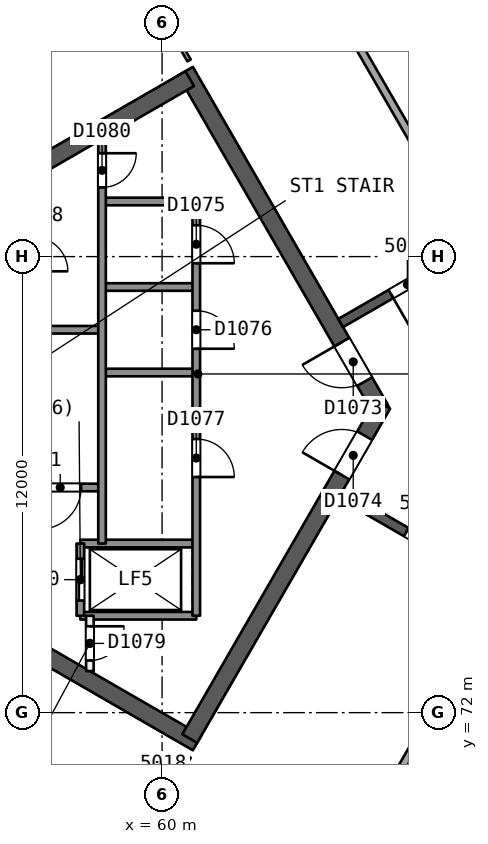
"""IFC4 building model, lengths in metres.
Left out: names, types, materials, properties, quantities, classifications, styles, units other than length and angle.
Written with IfcOpenShell. Run it as: python <this file> out.ifc"""

import sys

from ifc_helpers import new_model, si_unit, direction, frame, frame_2d, origin, place, context, subcontext, project, spatial, rectangle, extrude, element, fill, save


model = new_model("IFC4")
c1 = context("Model", 3, precision=1e-05, world=origin(), true_north=direction((0.0, 1.0)))
c2 = subcontext(c1, "Body", "Model", "MODEL_VIEW")
j1 = project(units=[si_unit("LENGTHUNIT", "METRE"), si_unit("PLANEANGLEUNIT", "RADIAN")], contexts=[c1])
p1 = place(None, origin())
s1 = spatial("IfcSite", under=j1, at=p1, CompositionType="ELEMENT")
p2 = place(p1, origin())
s2 = spatial("IfcBuilding", under=s1, at=p2, CompositionType="ELEMENT")
p3 = place(p2, frame((0.0, 0.0, 205.8)))
s3 = spatial("IfcBuildingStorey", under=s2, at=p3, CompositionType="ELEMENT", Elevation=205.8)
p4 = place(p3, frame((65.74, 80.0, 0.0), z_axis=(0.0, 0.0, 1.0), x_axis=(-0.499991857942, 0.866030104553, 0.0)))
e1 = element("IfcWall", 1, at=p4, inside=s3, PredefinedType="SHEAR", context=c2, shape_type="SweptSolid", body=[
    extrude(rectangle(XDim=10.25, YDim=0.45, at=frame_2d((5.125, 0.0))), origin(), (0.0, 0.0, 1.0), 3.7),
])
p5 = place(p4, frame((0.82, 0.0, 0.0)))
e2 = element("IfcOpeningElement", 2, at=p5, cuts=e1, PredefinedType="OPENING", context=c2, shape_type="SweptSolid", body=[
    extrude(rectangle(XDim=1.2, YDim=2.1, at=frame_2d((0.6, 1.05))), frame((0.0, 0.235, 0.0), z_axis=(0.0, -1.0, 0.0), x_axis=(1.0, 0.0, 0.0)), (0.0, 0.0, 1.0), 0.471),
])
p6 = place(p3, frame((60.728, 88.682, 0.0), z_axis=(0.0, 0.0, 1.0), x_axis=(-0.866021613849, -0.500006564303, 0.0)))
e3 = element("IfcWall", 3, at=p6, inside=s3, PredefinedType="SHEAR", context=c2, shape_type="SweptSolid", body=[
    extrude(rectangle(XDim=14.108, YDim=0.45, at=frame_2d((7.054, 0.0))), origin(), (0.0, 0.0, 1.0), 3.7),
])
p7 = place(p3, frame((48.622, 78.307, 0.0), z_axis=(0.0, 0.0, 1.0), x_axis=(0.86602701116, -0.499997215934, 0.0)))
e4 = element("IfcWall", 4, at=p7, inside=s3, PredefinedType="SHEAR", context=c2, shape_type="SweptSolid", body=[
    extrude(rectangle(XDim=14.204, YDim=0.45, at=frame_2d((7.102, 0.0))), origin(), (0.0, 0.0, 1.0), 3.7),
])
p8 = place(p3, frame((60.728, 71.318, 0.0), z_axis=(0.0, 0.0, 1.0), x_axis=(0.500012416173, 0.866018235185, 0.0)))
e5 = element("IfcWall", 5, at=p8, inside=s3, PredefinedType="SHEAR", context=c2, shape_type="SweptSolid", body=[
    extrude(rectangle(XDim=10.155, YDim=0.45, at=frame_2d((5.078, 0.0))), origin(), (0.0, 0.0, 1.0), 3.7),
])
p9 = place(p8, frame((8.005, 0.0, 0.0)))
e6 = element("IfcOpeningElement", 6, at=p9, cuts=e5, PredefinedType="OPENING", context=c2, shape_type="SweptSolid", body=[
    extrude(rectangle(XDim=1.2, YDim=2.1, at=frame_2d((0.6, 1.05))), frame((0.0, 0.235, 0.0), z_axis=(0.0, -1.0, 0.0), x_axis=(1.0, 0.0, 0.0)), (0.0, 0.0, 1.0), 0.471),
])
p10 = place(p3, frame((78.2, 90.046, 0.0), z_axis=(0.0, 0.0, 1.0), x_axis=(-0.866026492143, -0.499998114903, 0.0)))
e7 = element("IfcWall", 7, at=p10, inside=s3, PredefinedType="SHEAR", context=c2, shape_type="SweptSolid", body=[
    extrude(rectangle(XDim=15.588, YDim=0.25, at=frame_2d((7.794, 0.0))), origin(), (0.0, 0.0, 1.0), 3.3),
])
p11 = place(p10, frame((1.527, 0.0, 0.0)))
e8 = element("IfcOpeningElement", 8, at=p11, cuts=e7, PredefinedType="OPENING", context=c2, shape_type="SweptSolid", body=[
    extrude(rectangle(XDim=1.0, YDim=2.1, at=frame_2d((0.5, 1.05))), frame((0.0, 0.135, 0.0), z_axis=(0.0, -1.0, 0.0), x_axis=(1.0, 0.0, 0.0)), (0.0, 0.0, 1.0), 0.271),
])
p12 = place(p10, frame((8.694, 0.0, 0.0)))
e9 = element("IfcOpeningElement", 9, at=p12, cuts=e7, PredefinedType="OPENING", context=c2, shape_type="SweptSolid", body=[
    extrude(rectangle(XDim=1.1, YDim=2.1, at=frame_2d((0.55, 1.05))), frame((0.0, 0.135, 0.0), z_axis=(0.0, -1.0, 0.0), x_axis=(1.0, 0.0, 0.0)), (0.0, 0.0, 1.0), 0.271),
])
p13 = place(p10, frame((13.062, 0.0, 0.0)))
e10 = element("IfcOpeningElement", 10, at=p13, cuts=e7, PredefinedType="OPENING", context=c2, shape_type="SweptSolid", body=[
    extrude(rectangle(XDim=1.0, YDim=2.1, at=frame_2d((0.5, 1.05))), frame((0.0, 0.135, 0.0), z_axis=(0.0, -1.0, 0.0), x_axis=(1.0, 0.0, 0.0)), (0.0, 0.0, 1.0), 0.271),
])
p14 = place(p3, frame((64.7, 77.748, 0.0), z_axis=(0.0, 0.0, 1.0), x_axis=(0.866026492143, -0.499998114903, 0.0)))
e11 = element("IfcWall", 11, at=p14, inside=s3, PredefinedType="SHEAR", context=c2, shape_type="SweptSolid", body=[
    extrude(rectangle(XDim=15.588, YDim=0.25, at=frame_2d((7.794, 0.0))), origin(), (0.0, 0.0, 1.0), 3.3),
])
p15 = place(p14, frame((1.994, 0.0, 0.0)))
e12 = element("IfcOpeningElement", 12, at=p15, cuts=e11, PredefinedType="OPENING", context=c2, shape_type="SweptSolid", body=[
    extrude(rectangle(XDim=1.0, YDim=2.1, at=frame_2d((0.5, 1.05))), frame((0.0, 0.135, 0.0), z_axis=(0.0, -1.0, 0.0), x_axis=(1.0, 0.0, 0.0)), (0.0, 0.0, 1.0), 0.271),
])
p16 = place(p14, frame((6.571, 0.0, 0.0)))
e13 = element("IfcOpeningElement", 13, at=p16, cuts=e11, PredefinedType="OPENING", context=c2, shape_type="SweptSolid", body=[
    extrude(rectangle(XDim=1.2, YDim=2.4, at=frame_2d((0.6, 1.2))), frame((0.0, 0.135, 0.0), z_axis=(0.0, -1.0, 0.0), x_axis=(1.0, 0.0, 0.0)), (0.0, 0.0, 1.0), 0.271),
])
p17 = place(p14, frame((11.971, 0.0, 0.0)))
e14 = element("IfcOpeningElement", 14, at=p17, cuts=e11, PredefinedType="OPENING", context=c2, shape_type="SweptSolid", body=[
    extrude(rectangle(XDim=1.0, YDim=2.1, at=frame_2d((0.5, 1.05))), frame((0.0, 0.135, 0.0), z_axis=(0.0, -1.0, 0.0), x_axis=(1.0, 0.0, 0.0)), (0.0, 0.0, 1.0), 0.271),
])
p18 = place(p3, frame((62.859, 93.546, 0.0), z_axis=(0.0, 0.0, 1.0), x_axis=(0.499993653641, -0.866029067825, 0.0)))
e15 = element("IfcWall", 15, at=p18, inside=s3, PredefinedType="PARTITIONING", context=c2, shape_type="SweptSolid", body=[
    extrude(rectangle(XDim=10.702, YDim=0.2, at=frame_2d((5.351, 0.0))), origin(), (0.0, 0.0, 1.0), 3.3),
])
p19 = place(p3, frame((59.349, 91.52, 0.0), z_axis=(0.0, 0.0, 1.0), x_axis=(0.499957886064, -0.866049716911, 0.0)))
e16 = element("IfcWall", 16, at=p19, inside=s3, PredefinedType="PARTITIONING", context=c2, shape_type="SweptSolid", body=[
    extrude(rectangle(XDim=2.723, YDim=0.1, at=frame_2d((1.361, 0.0))), origin(), (0.0, 0.0, 1.0), 3.3),
])
p20 = place(p19, frame((0.911, 0.0, 0.0)))
e17 = element("IfcOpeningElement", 17, at=p20, cuts=e16, PredefinedType="OPENING", context=c2, shape_type="SweptSolid", body=[
    extrude(rectangle(XDim=0.9, YDim=2.1, at=frame_2d((0.45, 1.05))), frame((0.0, 0.061, 0.0), z_axis=(0.0, -1.0, 0.0), x_axis=(1.0, 0.0, 0.0)), (0.0, 0.0, 1.0), 0.121),
])
p21 = place(p3, frame((60.71, 70.838, 0.0), z_axis=(0.0, 0.0, 1.0), x_axis=(-0.499957886064, -0.866049716911, 0.0)))
e18 = element("IfcWall", 18, at=p21, inside=s3, PredefinedType="PARTITIONING", context=c2, shape_type="SweptSolid", body=[
    extrude(rectangle(XDim=2.723, YDim=0.1, at=frame_2d((1.361, 0.0))), origin(), (0.0, 0.0, 1.0), 3.3),
])
p22 = place(p21, frame((0.911, 0.0, 0.0)))
e19 = element("IfcOpeningElement", 19, at=p22, cuts=e18, PredefinedType="OPENING", context=c2, shape_type="SweptSolid", body=[
    extrude(rectangle(XDim=0.9, YDim=2.1, at=frame_2d((0.45, 1.05))), frame((0.0, 0.061, 0.0), z_axis=(0.0, -1.0, 0.0), x_axis=(1.0, 0.0, 0.0)), (0.0, 0.0, 1.0), 0.121),
])
p23 = place(p3, frame((63.669, 65.986, 0.0), z_axis=(0.0, 0.0, 1.0), x_axis=(0.499993653641, 0.866029067825, 0.0)))
e20 = element("IfcWall", 20, at=p23, inside=s3, PredefinedType="PARTITIONING", context=c2, shape_type="SweptSolid", body=[
    extrude(rectangle(XDim=10.702, YDim=0.2, at=frame_2d((5.351, 0.0))), origin(), (0.0, 0.0, 1.0), 3.3),
])
p24 = place(p3, frame((43.672, 82.641, 0.0), z_axis=(0.0, 0.0, 1.0), x_axis=(0.866024917385, 0.500000842468, 0.0)))
e21 = element("IfcWall", 21, at=p24, inside=s3, PredefinedType="SOLIDWALL", context=c2, shape_type="SweptSolid", body=[
    extrude(rectangle(XDim=51.621, YDim=0.3, at=frame_2d((25.811, 0.0))), origin(), (0.0, 0.0, 1.0), 3.3),
])
p25 = place(p24, frame((24.611, 0.0, 0.0)))
e22 = element("IfcOpeningElement", 22, at=p25, cuts=e21, PredefinedType="OPENING", context=c2, shape_type="SweptSolid", body=[
    extrude(rectangle(XDim=2.4, YDim=2.4, at=frame_2d((1.2, 1.2))), frame((0.0, 0.161, 0.0), z_axis=(0.0, -1.0, 0.0), x_axis=(1.0, 0.0, 0.0)), (0.0, 0.0, 1.0), 0.321),
])
p26 = place(p24, frame((30.378, 0.0, 0.0)))
e23 = element("IfcOpeningElement", 23, at=p26, cuts=e21, PredefinedType="OPENING", context=c2, shape_type="SweptSolid", body=[
    extrude(rectangle(XDim=2.4, YDim=2.4, at=frame_2d((1.2, 1.2))), frame((0.0, 0.161, 0.0), z_axis=(0.0, -1.0, 0.0), x_axis=(1.0, 0.0, 0.0)), (0.0, 0.0, 1.0), 0.321),
])
p27 = place(p24, frame((40.147, 0.0, 0.0)))
e24 = element("IfcOpeningElement", 24, at=p27, cuts=e21, PredefinedType="OPENING", context=c2, shape_type="SweptSolid", body=[
    extrude(rectangle(XDim=2.4, YDim=2.4, at=frame_2d((1.2, 1.2))), frame((0.0, 0.161, 0.0), z_axis=(0.0, -1.0, 0.0), x_axis=(1.0, 0.0, 0.0)), (0.0, 0.0, 1.0), 0.321),
])
p28 = place(p24, frame((18.843, 0.0, 0.0)))
e25 = element("IfcOpeningElement", 25, at=p28, cuts=e21, PredefinedType="OPENING", context=c2, shape_type="SweptSolid", body=[
    extrude(rectangle(XDim=2.4, YDim=2.4, at=frame_2d((1.2, 1.2))), frame((0.0, 0.161, 0.0), z_axis=(0.0, -1.0, 0.0), x_axis=(1.0, 0.0, 0.0)), (0.0, 0.0, 1.0), 0.321),
])
p29 = place(p24, frame((9.107, 0.0, 0.0)))
e26 = element("IfcOpeningElement", 26, at=p29, cuts=e21, PredefinedType="OPENING", context=c2, shape_type="SweptSolid", body=[
    extrude(rectangle(XDim=2.4, YDim=2.4, at=frame_2d((1.2, 1.2))), frame((0.0, 0.161, 0.0), z_axis=(0.0, -1.0, 0.0), x_axis=(1.0, 0.0, 0.0)), (0.0, 0.0, 1.0), 0.321),
])
p30 = place(p3, frame((88.377, 51.549, 0.0), z_axis=(0.0, 0.0, 1.0), x_axis=(-0.866024917385, 0.500000842468, 0.0)))
e27 = element("IfcWall", 27, at=p30, inside=s3, PredefinedType="SOLIDWALL", context=c2, shape_type="SweptSolid", body=[
    extrude(rectangle(XDim=51.621, YDim=0.3, at=frame_2d((25.811, 0.0))), origin(), (0.0, 0.0, 1.0), 3.3),
])
p31 = place(p30, frame((29.911, 0.0, 0.0)))
e28 = element("IfcOpeningElement", 28, at=p31, cuts=e27, PredefinedType="OPENING", context=c2, shape_type="SweptSolid", body=[
    extrude(rectangle(XDim=2.4, YDim=2.4, at=frame_2d((1.2, 1.2))), frame((0.0, 0.161, 0.0), z_axis=(0.0, -1.0, 0.0), x_axis=(1.0, 0.0, 0.0)), (0.0, 0.0, 1.0), 0.321),
])
p32 = place(p30, frame((40.147, 0.0, 0.0)))
e29 = element("IfcOpeningElement", 29, at=p32, cuts=e27, PredefinedType="OPENING", context=c2, shape_type="SweptSolid", body=[
    extrude(rectangle(XDim=2.4, YDim=2.4, at=frame_2d((1.2, 1.2))), frame((0.0, 0.161, 0.0), z_axis=(0.0, -1.0, 0.0), x_axis=(1.0, 0.0, 0.0)), (0.0, 0.0, 1.0), 0.321),
])
p33 = place(p30, frame((19.934, 0.0, 0.0)))
e30 = element("IfcOpeningElement", 30, at=p33, cuts=e27, PredefinedType="OPENING", context=c2, shape_type="SweptSolid", body=[
    extrude(rectangle(XDim=2.4, YDim=2.4, at=frame_2d((1.2, 1.2))), frame((0.0, 0.161, 0.0), z_axis=(0.0, -1.0, 0.0), x_axis=(1.0, 0.0, 0.0)), (0.0, 0.0, 1.0), 0.321),
])
p34 = place(p30, frame((9.107, 0.0, 0.0)))
e31 = element("IfcOpeningElement", 31, at=p34, cuts=e27, PredefinedType="OPENING", context=c2, shape_type="SweptSolid", body=[
    extrude(rectangle(XDim=2.4, YDim=2.4, at=frame_2d((1.2, 1.2))), frame((0.0, 0.161, 0.0), z_axis=(0.0, -1.0, 0.0), x_axis=(1.0, 0.0, 0.0)), (0.0, 0.0, 1.0), 0.321),
])
p35 = place(p30, frame((25.534, 0.0, 0.9)))
e32 = element("IfcOpeningElement", 32, at=p35, cuts=e27, PredefinedType="OPENING", context=c2, shape_type="SweptSolid", body=[
    extrude(rectangle(XDim=1.8, YDim=1.5, at=frame_2d((0.9, 0.75))), frame((0.0, 0.161, 0.0), z_axis=(0.0, -1.0, 0.0), x_axis=(1.0, 0.0, 0.0)), (0.0, 0.0, 1.0), 0.321),
])
for number, where, z_axis, x_axis in (
    (33, (60.9, 85.45, 0.0), (0.0, 0.0, 1.0), (-1.0, 0.0, 0.0)),
    (34, (60.9, 83.2, 0.0), (0.0, 0.0, 1.0), (-1.0, 0.0, 0.0)),
):
    element("IfcWall", number, at=place(p3, frame(where, z_axis=z_axis, x_axis=x_axis)), inside=s3, PredefinedType="SOLIDWALL", context=c2, shape_type="SweptSolid", body=[
        extrude(rectangle(XDim=2.48, YDim=0.2, at=frame_2d((1.24, 0.0))), origin(), (0.0, 0.0, 1.0), 3.3),
    ])
p36 = place(p3, frame((58.42, 82.075, 0.0), z_axis=(0.0, 0.0, 1.0), x_axis=(-1.0, 0.0, 0.0)))
e35 = element("IfcWall", 35, at=p36, inside=s3, PredefinedType="SOLIDWALL", context=c2, shape_type="SweptSolid", body=[
    extrude(rectangle(XDim=7.7, YDim=0.2, at=frame_2d((3.85, 0.0))), origin(), (0.0, 0.0, 1.0), 3.3),
])
p37 = place(p3, frame((60.9, 80.95, 0.0), z_axis=(0.0, 0.0, 1.0), x_axis=(-1.0, 0.0, 0.0)))
e36 = element("IfcWall", 36, at=p37, inside=s3, PredefinedType="SOLIDWALL", context=c2, shape_type="SweptSolid", body=[
    extrude(rectangle(XDim=2.48, YDim=0.2, at=frame_2d((1.24, 0.0))), origin(), (0.0, 0.0, 1.0), 3.3),
])
p38 = place(p3, frame((58.42, 77.925, 0.0), z_axis=(0.0, 0.0, 1.0), x_axis=(-1.0, 0.0, 0.0)))
e37 = element("IfcWall", 37, at=p38, inside=s3, PredefinedType="SOLIDWALL", context=c2, shape_type="SweptSolid", body=[
    extrude(rectangle(XDim=7.7, YDim=0.2, at=frame_2d((3.85, 0.0))), origin(), (0.0, 0.0, 1.0), 3.3),
])
p39 = place(p38, frame((0.55, 0.0, 0.0)))
e38 = element("IfcOpeningElement", 38, at=p39, cuts=e37, PredefinedType="OPENING", context=c2, shape_type="SweptSolid", body=[
    extrude(rectangle(XDim=1.1, YDim=2.1, at=frame_2d((0.55, 1.05))), frame((0.0, 0.11, 0.0), z_axis=(0.0, -1.0, 0.0), x_axis=(1.0, 0.0, 0.0)), (0.0, 0.0, 1.0), 0.221),
])
for number, where, z_axis, x_axis in (
    (39, (60.9, 76.45, 0.0), (0.0, 0.0, 1.0), (-1.0, 0.0, 0.0)),
    (40, (60.9, 74.55, 0.0), (0.0, 0.0, 1.0), (-1.0, 0.0, 0.0)),
):
    element("IfcWall", number, at=place(p3, frame(where, z_axis=z_axis, x_axis=x_axis)), inside=s3, PredefinedType="SOLIDWALL", context=c2, shape_type="SweptSolid", body=[
        extrude(rectangle(XDim=3.05, YDim=0.2, at=frame_2d((1.525, 0.0))), origin(), (0.0, 0.0, 1.0), 3.3),
    ])
p40 = place(p3, frame((60.9, 85.45, 0.0), z_axis=(0.0, 0.0, 1.0), x_axis=(0.0, -1.0, 0.0)))
e41 = element("IfcWall", 41, at=p40, inside=s3, PredefinedType="SOLIDWALL", context=c2, shape_type="SweptSolid", body=[
    extrude(rectangle(XDim=10.9, YDim=0.2, at=frame_2d((5.45, 0.0))), origin(), (0.0, 0.0, 1.0), 3.3),
])
p41 = place(p40, frame((0.625, 0.0, 0.0)))
e42 = element("IfcOpeningElement", 42, at=p41, cuts=e41, PredefinedType="OPENING", context=c2, shape_type="SweptSolid", body=[
    extrude(rectangle(XDim=1.0, YDim=2.1, at=frame_2d((0.5, 1.05))), frame((0.0, 0.11, 0.0), z_axis=(0.0, -1.0, 0.0), x_axis=(1.0, 0.0, 0.0)), (0.0, 0.0, 1.0), 0.221),
])
p42 = place(p40, frame((2.875, 0.0, 0.0)))
e43 = element("IfcOpeningElement", 43, at=p42, cuts=e41, PredefinedType="OPENING", context=c2, shape_type="SweptSolid", body=[
    extrude(rectangle(XDim=1.0, YDim=2.1, at=frame_2d((0.5, 1.05))), frame((0.0, 0.11, 0.0), z_axis=(0.0, -1.0, 0.0), x_axis=(1.0, 0.0, 0.0)), (0.0, 0.0, 1.0), 0.221),
])
p43 = place(p40, frame((6.25, 0.0, 0.0)))
e44 = element("IfcOpeningElement", 44, at=p43, cuts=e41, PredefinedType="OPENING", context=c2, shape_type="SweptSolid", body=[
    extrude(rectangle(XDim=1.0, YDim=2.1, at=frame_2d((0.5, 1.05))), frame((0.0, 0.11, 0.0), z_axis=(0.0, -1.0, 0.0), x_axis=(1.0, 0.0, 0.0)), (0.0, 0.0, 1.0), 0.221),
])
p44 = place(p3, frame((58.42, 87.09, 0.0), z_axis=(0.0, 0.0, 1.0), x_axis=(0.0, -1.0, 0.0)))
e45 = element("IfcWall", 45, at=p44, inside=s3, PredefinedType="SOLIDWALL", context=c2, shape_type="SweptSolid", body=[
    extrude(rectangle(XDim=10.64, YDim=0.2, at=frame_2d((5.32, 0.0))), origin(), (0.0, 0.0, 1.0), 3.3),
])
p45 = place(p44, frame((0.37, 0.0, 0.0)))
e46 = element("IfcOpeningElement", 46, at=p45, cuts=e45, PredefinedType="OPENING", context=c2, shape_type="SweptSolid", body=[
    extrude(rectangle(XDim=0.9, YDim=2.1, at=frame_2d((0.45, 1.05))), frame((0.0, 0.11, 0.0), z_axis=(0.0, -1.0, 0.0), x_axis=(1.0, 0.0, 0.0)), (0.0, 0.0, 1.0), 0.221),
])
p46 = place(p3, frame((58.1, 74.55, 0.0), z_axis=(0.0, 0.0, 1.0), x_axis=(0.0, -1.0, 0.0)))
e47 = element("IfcWall", 47, at=p46, inside=s3, PredefinedType="PARTITIONING", context=c2, shape_type="SweptSolid", body=[
    extrude(rectangle(XDim=1.455, YDim=0.2, at=frame_2d((0.728, 0.0))), origin(), (0.0, 0.0, 1.0), 3.3),
])
p47 = place(p46, frame((0.278, 0.0, 0.0)))
e48 = element("IfcOpeningElement", 48, at=p47, cuts=e47, PredefinedType="OPENING", context=c2, shape_type="SweptSolid", body=[
    extrude(rectangle(XDim=0.9, YDim=2.1, at=frame_2d((0.45, 1.05))), frame((0.0, 0.11, 0.0), z_axis=(0.0, -1.0, 0.0), x_axis=(1.0, 0.0, 0.0)), (0.0, 0.0, 1.0), 0.221),
])
p48 = place(p3, frame((57.85, 76.45, 0.0), z_axis=(0.0, 0.0, 1.0), x_axis=(0.0, -1.0, 0.0)))
e49 = element("IfcWall", 49, at=p48, inside=s3, PredefinedType="SOLIDWALL", context=c2, shape_type="SweptSolid", body=[
    extrude(rectangle(XDim=1.9, YDim=0.2, at=frame_2d((0.95, 0.0))), origin(), (0.0, 0.0, 1.0), 3.3),
])
p49 = place(p48, frame((0.4, 0.0, 0.0)))
e50 = element("IfcOpeningElement", 50, at=p49, cuts=e49, PredefinedType="OPENING", context=c2, shape_type="SweptSolid", body=[
    extrude(rectangle(XDim=1.1, YDim=2.1, at=frame_2d((0.55, 1.05))), frame((0.0, 0.11, 0.0), z_axis=(0.0, -1.0, 0.0), x_axis=(1.0, 0.0, 0.0)), (0.0, 0.0, 1.0), 0.221),
])
p50 = place(p13, origin())
e51 = element("IfcDoor", 51, at=p50, inside=s3, OperationType="SINGLE_SWING_RIGHT", PredefinedType="NOTDEFINED", context=c2, shape_type="SweptSolid", body=[
    extrude(rectangle(XDim=1.0, YDim=2.1, at=frame_2d((0.5, 1.05))), frame((0.0, 0.025, 0.0), z_axis=(0.0, -1.0, 0.0), x_axis=(1.0, 0.0, 0.0)), (0.0, 0.0, 1.0), 0.05),
])
fill(e10, e51)
p51 = place(p15, origin())
e52 = element("IfcDoor", 52, at=p51, inside=s3, OperationType="SINGLE_SWING_LEFT", PredefinedType="NOTDEFINED", context=c2, shape_type="SweptSolid", body=[
    extrude(rectangle(XDim=1.0, YDim=2.1, at=frame_2d((0.5, 1.05))), frame((0.0, 0.025, 0.0), z_axis=(0.0, -1.0, 0.0), x_axis=(1.0, 0.0, 0.0)), (0.0, 0.0, 1.0), 0.05),
])
fill(e12, e52)
p52 = place(p5, origin())
e53 = element("IfcDoor", 53, at=p52, inside=s3, OperationType="SINGLE_SWING_RIGHT", PredefinedType="NOTDEFINED", context=c2, shape_type="SweptSolid", body=[
    extrude(rectangle(XDim=1.2, YDim=2.1, at=frame_2d((0.6, 1.05))), frame((0.0, 0.025, 0.0), z_axis=(0.0, -1.0, 0.0), x_axis=(1.0, 0.0, 0.0)), (0.0, 0.0, 1.0), 0.05),
])
fill(e2, e53)
p53 = place(p9, origin())
e54 = element("IfcDoor", 54, at=p53, inside=s3, OperationType="SINGLE_SWING_LEFT", PredefinedType="NOTDEFINED", context=c2, shape_type="SweptSolid", body=[
    extrude(rectangle(XDim=1.2, YDim=2.1, at=frame_2d((0.6, 1.05))), frame((0.0, 0.025, 0.0), z_axis=(0.0, -1.0, 0.0), x_axis=(1.0, 0.0, 0.0)), (0.0, 0.0, 1.0), 0.05),
])
fill(e6, e54)
p54 = place(p49, origin())
e55 = element("IfcDoor", 55, at=p54, inside=s3, OperationType="SLIDING_TO_RIGHT", PredefinedType="NOTDEFINED", context=c2, shape_type="SweptSolid", body=[
    extrude(rectangle(XDim=1.1, YDim=2.1, at=frame_2d((0.55, 1.05))), frame((0.0, 0.025, 0.0), z_axis=(0.0, -1.0, 0.0), x_axis=(1.0, 0.0, 0.0)), (0.0, 0.0, 1.0), 0.05),
])
fill(e50, e55)
p55 = place(p41, origin())
e56 = element("IfcDoor", 56, at=p55, inside=s3, OperationType="SINGLE_SWING_RIGHT", PredefinedType="NOTDEFINED", context=c2, shape_type="SweptSolid", body=[
    extrude(rectangle(XDim=1.0, YDim=2.1, at=frame_2d((0.5, 1.05))), frame((0.0, 0.025, 0.0), z_axis=(0.0, -1.0, 0.0), x_axis=(1.0, 0.0, 0.0)), (0.0, 0.0, 1.0), 0.05),
])
fill(e42, e56)
p56 = place(p42, origin())
e57 = element("IfcDoor", 57, at=p56, inside=s3, OperationType="SINGLE_SWING_RIGHT", PredefinedType="NOTDEFINED", context=c2, shape_type="SweptSolid", body=[
    extrude(rectangle(XDim=1.0, YDim=2.1, at=frame_2d((0.5, 1.05))), frame((0.0, 0.025, 0.0), z_axis=(0.0, -1.0, 0.0), x_axis=(1.0, 0.0, 0.0)), (0.0, 0.0, 1.0), 0.05),
])
fill(e43, e57)
p57 = place(p43, origin())
e58 = element("IfcDoor", 58, at=p57, inside=s3, OperationType="SINGLE_SWING_RIGHT", PredefinedType="NOTDEFINED", context=c2, shape_type="SweptSolid", body=[
    extrude(rectangle(XDim=1.0, YDim=2.1, at=frame_2d((0.5, 1.05))), frame((0.0, 0.025, 0.0), z_axis=(0.0, -1.0, 0.0), x_axis=(1.0, 0.0, 0.0)), (0.0, 0.0, 1.0), 0.05),
])
fill(e44, e58)
p58 = place(p47, origin())
e59 = element("IfcDoor", 59, at=p58, inside=s3, OperationType="SINGLE_SWING_LEFT", PredefinedType="NOTDEFINED", context=c2, shape_type="SweptSolid", body=[
    extrude(rectangle(XDim=0.9, YDim=2.1, at=frame_2d((0.45, 1.05))), frame((0.0, 0.025, 0.0), z_axis=(0.0, -1.0, 0.0), x_axis=(1.0, 0.0, 0.0)), (0.0, 0.0, 1.0), 0.05),
])
fill(e48, e59)
p59 = place(p45, origin())
e60 = element("IfcDoor", 60, at=p59, inside=s3, OperationType="SINGLE_SWING_LEFT", PredefinedType="NOTDEFINED", context=c2, shape_type="SweptSolid", body=[
    extrude(rectangle(XDim=0.9, YDim=2.1, at=frame_2d((0.45, 1.05))), frame((0.0, 0.025, 0.0), z_axis=(0.0, -1.0, 0.0), x_axis=(1.0, 0.0, 0.0)), (0.0, 0.0, 1.0), 0.05),
])
fill(e46, e60)
p60 = place(p39, origin())
e61 = element("IfcDoor", 61, at=p60, inside=s3, OperationType="SINGLE_SWING_RIGHT", PredefinedType="NOTDEFINED", context=c2, shape_type="SweptSolid", body=[
    extrude(rectangle(XDim=1.1, YDim=2.1, at=frame_2d((0.55, 1.05))), frame((0.0, 0.025, 0.0), z_axis=(0.0, -1.0, 0.0), x_axis=(1.0, 0.0, 0.0)), (0.0, 0.0, 1.0), 0.05),
])
fill(e38, e61)
save(model, sys.argv[1])
